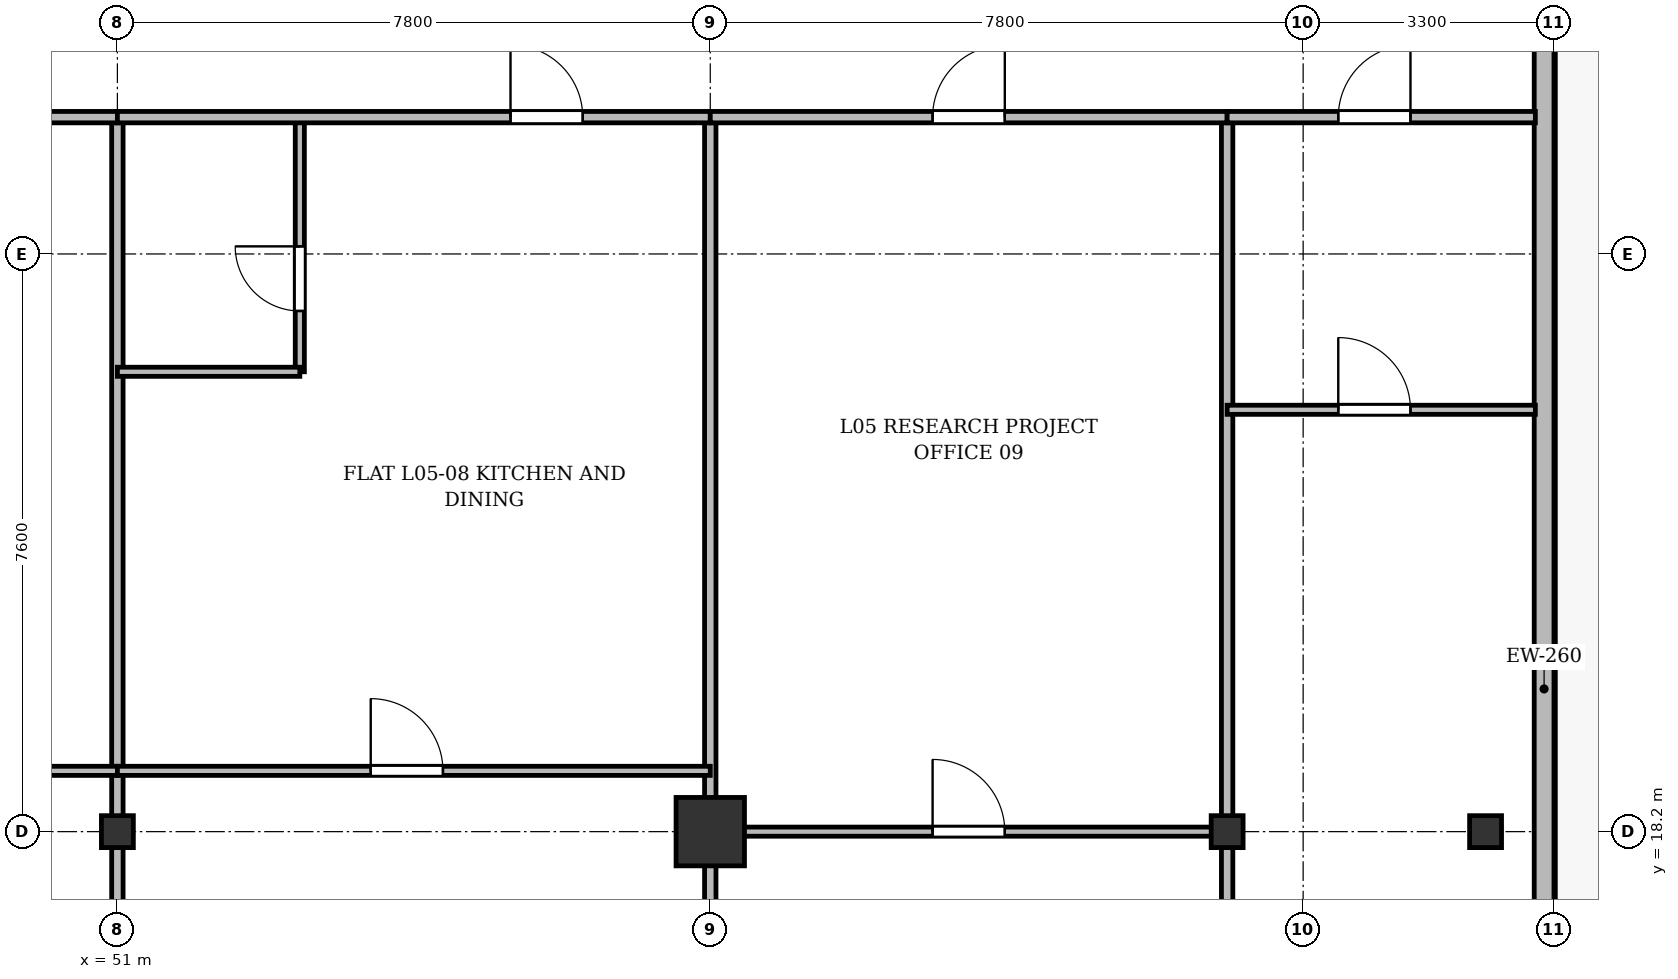
"""IFC4 building model, lengths in metres.
Left out: names, types, materials, properties, quantities, classifications, styles, units other than length and angle.
Written with IfcOpenShell. Run it as: python <this file> out.ifc"""

import sys

from ifc_helpers import new_model, si_unit, direction, frame, frame_2d, origin, origin_2d, place, context, subcontext, project, spatial, rectangle, i_section, extrude, source, transform, mapped, element, fill, save


model = new_model("IFC4")
c1 = context("Model", 3, precision=1e-05, world=origin(), true_north=direction((0.0, 1.0)))
c2 = subcontext(c1, "Body", "Model", "MODEL_VIEW")
j1 = project(units=[si_unit("LENGTHUNIT", "METRE"), si_unit("PLANEANGLEUNIT", "RADIAN")], contexts=[c1])
p1 = place(None, origin())
s1 = spatial("IfcSite", under=j1, at=p1, CompositionType="ELEMENT")
p2 = place(p1, origin())
s2 = spatial("IfcBuilding", under=s1, at=p2, CompositionType="ELEMENT")
p3 = place(p2, frame((0.0, 0.0, 23.5)))
s3 = spatial("IfcBuildingStorey", under=s2, at=p3, CompositionType="ELEMENT", Elevation=23.5)
m1 = source(origin(), c2, "Body", "SweptSolid", [
    extrude(i_section(OverallWidth=0.42, OverallDepth=0.42, WebThickness=0.026, FlangeThickness=0.04, at=origin_2d()), origin(), (0.0, 0.0, 1.0), 3.6),
])
p4 = place(p3, frame((51.0, 18.2, 0.0), z_axis=(0.0, 0.0, 1.0), x_axis=(1.0, 0.0, 0.0)))
e1 = element("IfcColumn", 1, at=p4, inside=s3, PredefinedType="COLUMN", context=c2, shape_type="MappedRepresentation", body=[
    mapped(m1, transform((0.0, 0.0, 0.0), x_axis=(1.0, 0.0, 0.0), y_axis=(0.0, 1.0, 0.0), z_axis=(0.0, 0.0, 1.0), scale=1.0)),
])
m2 = source(origin(), c2, "Body", "SweptSolid", [
    extrude(rectangle(XDim=0.9, YDim=0.9, at=origin_2d()), origin(), (0.0, 0.0, 1.0), 3.6),
])
p5 = place(p3, frame((58.8, 18.2, 0.0), z_axis=(0.0, 0.0, 1.0), x_axis=(1.0, 0.0, 0.0)))
e2 = element("IfcColumn", 2, at=p5, inside=s3, PredefinedType="COLUMN", context=c2, shape_type="MappedRepresentation", body=[
    mapped(m2, transform((0.0, 0.0, 0.0), x_axis=(1.0, 0.0, 0.0), y_axis=(0.0, 1.0, 0.0), z_axis=(0.0, 0.0, 1.0), scale=1.0)),
])
for number, where, z_axis, x_axis in (
    (3, (65.6, 18.2, 0.0), (0.0, 0.0, 1.0), (1.0, 0.0, 0.0)),
    (4, (69.0, 18.2, 0.0), (0.0, 0.0, 1.0), (1.0, 0.0, 0.0)),
):
    element("IfcColumn", number, at=place(p3, frame(where, z_axis=z_axis, x_axis=x_axis)), inside=s3, PredefinedType="COLUMN", context=c2, shape_type="MappedRepresentation", body=[
        mapped(m1, transform((0.0, 0.0, 0.0), x_axis=(1.0, 0.0, 0.0), y_axis=(0.0, 1.0, 0.0), z_axis=(0.0, 0.0, 1.0), scale=1.0)),
    ])
p6 = place(p3, frame((69.77, 45.5, 0.0), z_axis=(0.0, 0.0, 1.0), x_axis=(0.0, -1.0, 0.0)))
e5 = element("IfcWall", 5, at=p6, inside=s3, PredefinedType="SOLIDWALL", context=c2, shape_type="SweptSolid", body=[
    extrude(rectangle(XDim=39.6, YDim=0.26, at=frame_2d((19.8, 0.0))), origin(), (0.0, 0.0, 1.0), 3.34),
])
p7 = place(p6, frame((9.745, 0.0, 0.0)))
e6 = element("IfcOpeningElement", 6, at=p7, cuts=e5, PredefinedType="OPENING", context=c2, shape_type="SweptSolid", body=[
    extrude(rectangle(XDim=1.2, YDim=2.2, at=frame_2d((0.6, 1.1))), frame((0.0, 0.14, 0.0), z_axis=(0.0, -1.0, 0.0), x_axis=(1.0, 0.0, 0.0)), (0.0, 0.0, 1.0), 0.28),
])
p8 = place(p6, frame((36.95, 0.0, 0.92)))
e7 = element("IfcOpeningElement", 7, at=p8, cuts=e5, PredefinedType="OPENING", context=c2, shape_type="SweptSolid", body=[
    extrude(rectangle(XDim=1.2, YDim=1.65, at=frame_2d((0.6, 0.825))), frame((0.0, 0.14, 0.0), z_axis=(0.0, -1.0, 0.0), x_axis=(1.0, 0.0, 0.0)), (0.0, 0.0, 1.0), 0.28),
])
p9 = place(p6, frame((32.9, 0.0, 0.92)))
e8 = element("IfcOpeningElement", 8, at=p9, cuts=e5, PredefinedType="OPENING", context=c2, shape_type="SweptSolid", body=[
    extrude(rectangle(XDim=2.4, YDim=2.1, at=frame_2d((1.2, 1.05))), frame((0.0, 0.14, 0.0), z_axis=(0.0, -1.0, 0.0), x_axis=(1.0, 0.0, 0.0)), (0.0, 0.0, 1.0), 0.28),
])
p10 = place(p6, frame((28.7, 0.0, 0.92)))
e9 = element("IfcOpeningElement", 9, at=p10, cuts=e5, PredefinedType="OPENING", context=c2, shape_type="SweptSolid", body=[
    extrude(rectangle(XDim=2.4, YDim=2.1, at=frame_2d((1.2, 1.05))), frame((0.0, 0.14, 0.0), z_axis=(0.0, -1.0, 0.0), x_axis=(1.0, 0.0, 0.0)), (0.0, 0.0, 1.0), 0.28),
])
p11 = place(p6, frame((4.5, 0.0, 0.92)))
e10 = element("IfcOpeningElement", 10, at=p11, cuts=e5, PredefinedType="OPENING", context=c2, shape_type="SweptSolid", body=[
    extrude(rectangle(XDim=1.2, YDim=1.65, at=frame_2d((0.6, 0.825))), frame((0.0, 0.14, 0.0), z_axis=(0.0, -1.0, 0.0), x_axis=(1.0, 0.0, 0.0)), (0.0, 0.0, 1.0), 0.28),
])
p12 = place(p6, frame((1.15, 0.0, 0.92)))
e11 = element("IfcOpeningElement", 11, at=p12, cuts=e5, PredefinedType="OPENING", context=c2, shape_type="SweptSolid", body=[
    extrude(rectangle(XDim=1.2, YDim=1.65, at=frame_2d((0.6, 0.825))), frame((0.0, 0.14, 0.0), z_axis=(0.0, -1.0, 0.0), x_axis=(1.0, 0.0, 0.0)), (0.0, 0.0, 1.0), 0.28),
])
for number, where, z_axis, x_axis in (
    (12, (51.0, 3.145, 0.0), (0.0, 0.0, 1.0), (0.0, 1.0, 0.0)),
    (13, (58.8, 3.145, 0.0), (0.0, 0.0, 1.0), (0.0, 1.0, 0.0)),
    (14, (65.6, 3.145, 0.0), (0.0, 0.0, 1.0), (0.0, 1.0, 0.0)),
):
    element("IfcWall", number, at=place(p3, frame(where, z_axis=z_axis, x_axis=x_axis)), inside=s3, PredefinedType="PARTITIONING", context=c2, shape_type="SweptSolid", body=[
        extrude(rectangle(XDim=24.455, YDim=0.15, at=frame_2d((12.228, 0.0))), origin(), (0.0, 0.0, 1.0), 2.752),
    ])
p13 = place(p3, frame((43.8, 19.0, 0.0), z_axis=(0.0, 0.0, 1.0), x_axis=(1.0, 0.0, 0.0)))
e15 = element("IfcWall", 15, at=p13, inside=s3, PredefinedType="PARTITIONING", context=c2, shape_type="SweptSolid", body=[
    extrude(rectangle(XDim=7.2, YDim=0.12, at=frame_2d((3.6, 0.0))), origin(), (0.0, 0.0, 1.0), 2.752),
])
p14 = place(p13, frame((3.125, 0.0, 0.0)))
e16 = element("IfcOpeningElement", 16, at=p14, cuts=e15, PredefinedType="OPENING", context=c2, shape_type="SweptSolid", body=[
    extrude(rectangle(XDim=0.95, YDim=2.15, at=frame_2d((0.475, 1.075))), frame((0.0, 0.07, 0.0), z_axis=(0.0, -1.0, 0.0), x_axis=(1.0, 0.0, 0.0)), (0.0, 0.0, 1.0), 0.14),
])
p15 = place(p3, frame((43.8, 27.6, 0.0), z_axis=(0.0, 0.0, 1.0), x_axis=(1.0, 0.0, 0.0)))
e17 = element("IfcWall", 17, at=p15, inside=s3, PredefinedType="PARTITIONING", context=c2, shape_type="SweptSolid", body=[
    extrude(rectangle(XDim=7.2, YDim=0.15, at=frame_2d((3.6, 0.0))), origin(), (0.0, 0.0, 1.0), 2.752),
])
p16 = place(p15, frame((4.706, 0.0, 0.0)))
e18 = element("IfcOpeningElement", 18, at=p16, cuts=e17, PredefinedType="OPENING", context=c2, shape_type="SweptSolid", body=[
    extrude(rectangle(XDim=0.95, YDim=2.15, at=frame_2d((0.475, 1.075))), frame((0.0, 0.085, 0.0), z_axis=(0.0, -1.0, 0.0), x_axis=(1.0, 0.0, 0.0)), (0.0, 0.0, 1.0), 0.17),
])
p17 = place(p3, frame((51.0, 19.0, 0.0), z_axis=(0.0, 0.0, 1.0), x_axis=(1.0, 0.0, 0.0)))
e19 = element("IfcWall", 19, at=p17, inside=s3, PredefinedType="PARTITIONING", context=c2, shape_type="SweptSolid", body=[
    extrude(rectangle(XDim=7.8, YDim=0.12, at=frame_2d((3.9, 0.0))), origin(), (0.0, 0.0, 1.0), 2.752),
])
p18 = place(p17, frame((3.333, 0.0, 0.0)))
e20 = element("IfcOpeningElement", 20, at=p18, cuts=e19, PredefinedType="OPENING", context=c2, shape_type="SweptSolid", body=[
    extrude(rectangle(XDim=0.95, YDim=2.15, at=frame_2d((0.475, 1.075))), frame((0.0, 0.07, 0.0), z_axis=(0.0, -1.0, 0.0), x_axis=(1.0, 0.0, 0.0)), (0.0, 0.0, 1.0), 0.14),
])
p19 = place(p3, frame((53.4, 24.25, 0.0), z_axis=(0.0, 0.0, 1.0), x_axis=(0.0, 1.0, 0.0)))
e21 = element("IfcWall", 21, at=p19, inside=s3, PredefinedType="PARTITIONING", context=c2, shape_type="SweptSolid", body=[
    extrude(rectangle(XDim=3.35, YDim=0.12, at=frame_2d((1.675, 0.0))), origin(), (0.0, 0.0, 1.0), 2.94),
])
p20 = place(p19, frame((0.8, 0.0, 0.0)))
e22 = element("IfcOpeningElement", 22, at=p20, cuts=e21, PredefinedType="OPENING", context=c2, shape_type="SweptSolid", body=[
    extrude(rectangle(XDim=0.85, YDim=2.1, at=frame_2d((0.425, 1.05))), frame((0.0, 0.07, 0.0), z_axis=(0.0, -1.0, 0.0), x_axis=(1.0, 0.0, 0.0)), (0.0, 0.0, 1.0), 0.14),
])
p21 = place(p3, frame((51.0, 24.25, 0.0), z_axis=(0.0, 0.0, 1.0), x_axis=(1.0, 0.0, 0.0)))
e23 = element("IfcWall", 23, at=p21, inside=s3, PredefinedType="PARTITIONING", context=c2, shape_type="SweptSolid", body=[
    extrude(rectangle(XDim=2.4, YDim=0.12, at=frame_2d((1.2, 0.0))), origin(), (0.0, 0.0, 1.0), 2.752),
])
p22 = place(p3, frame((51.0, 27.6, 0.0), z_axis=(0.0, 0.0, 1.0), x_axis=(1.0, 0.0, 0.0)))
e24 = element("IfcWall", 24, at=p22, inside=s3, PredefinedType="PARTITIONING", context=c2, shape_type="SweptSolid", body=[
    extrude(rectangle(XDim=7.8, YDim=0.15, at=frame_2d((3.9, 0.0))), origin(), (0.0, 0.0, 1.0), 2.752),
])
p23 = place(p22, frame((5.172, 0.0, 0.0)))
e25 = element("IfcOpeningElement", 25, at=p23, cuts=e24, PredefinedType="OPENING", context=c2, shape_type="SweptSolid", body=[
    extrude(rectangle(XDim=0.95, YDim=2.15, at=frame_2d((0.475, 1.075))), frame((0.0, 0.085, 0.0), z_axis=(0.0, -1.0, 0.0), x_axis=(1.0, 0.0, 0.0)), (0.0, 0.0, 1.0), 0.17),
])
p24 = place(p3, frame((58.8, 27.6, 0.0), z_axis=(0.0, 0.0, 1.0), x_axis=(1.0, 0.0, 0.0)))
e26 = element("IfcWall", 26, at=p24, inside=s3, PredefinedType="PARTITIONING", context=c2, shape_type="SweptSolid", body=[
    extrude(rectangle(XDim=6.8, YDim=0.15, at=frame_2d((3.4, 0.0))), origin(), (0.0, 0.0, 1.0), 2.752),
])
p25 = place(p24, frame((2.925, 0.0, 0.0)))
e27 = element("IfcOpeningElement", 27, at=p25, cuts=e26, PredefinedType="OPENING", context=c2, shape_type="SweptSolid", body=[
    extrude(rectangle(XDim=0.95, YDim=2.15, at=frame_2d((0.475, 1.075))), frame((0.0, 0.085, 0.0), z_axis=(0.0, -1.0, 0.0), x_axis=(1.0, 0.0, 0.0)), (0.0, 0.0, 1.0), 0.17),
])
p26 = place(p3, frame((58.8, 18.2, 0.0), z_axis=(0.0, 0.0, 1.0), x_axis=(1.0, 0.0, 0.0)))
e28 = element("IfcWall", 28, at=p26, inside=s3, PredefinedType="PARTITIONING", context=c2, shape_type="SweptSolid", body=[
    extrude(rectangle(XDim=6.8, YDim=0.12, at=frame_2d((3.4, 0.0))), origin(), (0.0, 0.0, 1.0), 2.69),
])
p27 = place(p26, frame((2.925, 0.0, 0.0)))
e29 = element("IfcOpeningElement", 29, at=p27, cuts=e28, PredefinedType="OPENING", context=c2, shape_type="SweptSolid", body=[
    extrude(rectangle(XDim=0.95, YDim=2.15, at=frame_2d((0.475, 1.075))), frame((0.0, 0.07, 0.0), z_axis=(0.0, -1.0, 0.0), x_axis=(1.0, 0.0, 0.0)), (0.0, 0.0, 1.0), 0.14),
])
p28 = place(p3, frame((65.6, 27.6, 0.0), z_axis=(0.0, 0.0, 1.0), x_axis=(1.0, 0.0, 0.0)))
e30 = element("IfcWall", 30, at=p28, inside=s3, PredefinedType="PARTITIONING", context=c2, shape_type="SweptSolid", body=[
    extrude(rectangle(XDim=4.055, YDim=0.15, at=frame_2d((2.027, 0.0))), origin(), (0.0, 0.0, 1.0), 2.752),
])
p29 = place(p28, frame((1.462, 0.0, 0.0)))
e31 = element("IfcOpeningElement", 31, at=p29, cuts=e30, PredefinedType="OPENING", context=c2, shape_type="SweptSolid", body=[
    extrude(rectangle(XDim=0.95, YDim=2.15, at=frame_2d((0.475, 1.075))), frame((0.0, 0.085, 0.0), z_axis=(0.0, -1.0, 0.0), x_axis=(1.0, 0.0, 0.0)), (0.0, 0.0, 1.0), 0.17),
])
p30 = place(p3, frame((65.6, 23.75, 0.0), z_axis=(0.0, 0.0, 1.0), x_axis=(1.0, 0.0, 0.0)))
e32 = element("IfcWall", 32, at=p30, inside=s3, PredefinedType="PARTITIONING", context=c2, shape_type="SweptSolid", body=[
    extrude(rectangle(XDim=4.055, YDim=0.12, at=frame_2d((2.027, 0.0))), origin(), (0.0, 0.0, 1.0), 2.752),
])
p31 = place(p30, frame((1.462, 0.0, 0.0)))
e33 = element("IfcOpeningElement", 33, at=p31, cuts=e32, PredefinedType="OPENING", context=c2, shape_type="SweptSolid", body=[
    extrude(rectangle(XDim=0.95, YDim=2.15, at=frame_2d((0.475, 1.075))), frame((0.0, 0.07, 0.0), z_axis=(0.0, -1.0, 0.0), x_axis=(1.0, 0.0, 0.0)), (0.0, 0.0, 1.0), 0.14),
])
m3 = source(origin(), c2, "Body", "SweptSolid", [
    extrude(rectangle(XDim=0.95, YDim=2.15, at=frame_2d((0.475, 1.075))), frame((0.0, 0.025, 0.0), z_axis=(0.0, -1.0, 0.0), x_axis=(1.0, 0.0, 0.0)), (0.0, 0.0, 1.0), 0.05),
])
p32 = place(p18, origin())
e34 = element("IfcDoor", 34, at=p32, inside=s3, OperationType="SINGLE_SWING_LEFT", PredefinedType="DOOR", context=c2, shape_type="MappedRepresentation", body=[
    mapped(m3, transform((0.0, 0.0, 0.0), x_axis=(1.0, 0.0, 0.0), y_axis=(0.0, 1.0, 0.0), z_axis=(0.0, 0.0, 1.0), scale=1.0)),
])
fill(e20, e34)
m4 = source(origin(), c2, "Body", "SweptSolid", [
    extrude(rectangle(XDim=0.85, YDim=2.1, at=frame_2d((0.425, 1.05))), frame((0.0, 0.025, 0.0), z_axis=(0.0, -1.0, 0.0), x_axis=(1.0, 0.0, 0.0)), (0.0, 0.0, 1.0), 0.05),
])
p33 = place(p20, origin())
e35 = element("IfcDoor", 35, at=p33, inside=s3, OperationType="SINGLE_SWING_RIGHT", PredefinedType="DOOR", context=c2, shape_type="MappedRepresentation", body=[
    mapped(m4, transform((0.0, 0.0, 0.0), x_axis=(1.0, 0.0, 0.0), y_axis=(0.0, 1.0, 0.0), z_axis=(0.0, 0.0, 1.0), scale=1.0)),
])
fill(e22, e35)
p34 = place(p23, origin())
e36 = element("IfcDoor", 36, at=p34, inside=s3, OperationType="SINGLE_SWING_LEFT", PredefinedType="DOOR", context=c2, shape_type="MappedRepresentation", body=[
    mapped(m3, transform((0.0, 0.0, 0.0), x_axis=(1.0, 0.0, 0.0), y_axis=(0.0, 1.0, 0.0), z_axis=(0.0, 0.0, 1.0), scale=1.0)),
])
fill(e25, e36)
p35 = place(p25, origin())
e37 = element("IfcDoor", 37, at=p35, inside=s3, OperationType="SINGLE_SWING_RIGHT", PredefinedType="DOOR", context=c2, shape_type="MappedRepresentation", body=[
    mapped(m3, transform((0.0, 0.0, 0.0), x_axis=(1.0, 0.0, 0.0), y_axis=(0.0, 1.0, 0.0), z_axis=(0.0, 0.0, 1.0), scale=1.0)),
])
fill(e27, e37)
p36 = place(p27, origin())
e38 = element("IfcDoor", 38, at=p36, inside=s3, OperationType="SINGLE_SWING_LEFT", PredefinedType="DOOR", context=c2, shape_type="MappedRepresentation", body=[
    mapped(m3, transform((0.0, 0.0, 0.0), x_axis=(1.0, 0.0, 0.0), y_axis=(0.0, 1.0, 0.0), z_axis=(0.0, 0.0, 1.0), scale=1.0)),
])
fill(e29, e38)
p37 = place(p29, origin())
e39 = element("IfcDoor", 39, at=p37, inside=s3, OperationType="SINGLE_SWING_RIGHT", PredefinedType="DOOR", context=c2, shape_type="MappedRepresentation", body=[
    mapped(m3, transform((0.0, 0.0, 0.0), x_axis=(1.0, 0.0, 0.0), y_axis=(0.0, 1.0, 0.0), z_axis=(0.0, 0.0, 1.0), scale=1.0)),
])
fill(e31, e39)
p38 = place(p31, origin())
e40 = element("IfcDoor", 40, at=p38, inside=s3, OperationType="SINGLE_SWING_LEFT", PredefinedType="DOOR", context=c2, shape_type="MappedRepresentation", body=[
    mapped(m3, transform((0.0, 0.0, 0.0), x_axis=(1.0, 0.0, 0.0), y_axis=(0.0, 1.0, 0.0), z_axis=(0.0, 0.0, 1.0), scale=1.0)),
])
fill(e33, e40)
save(model, sys.argv[1])
